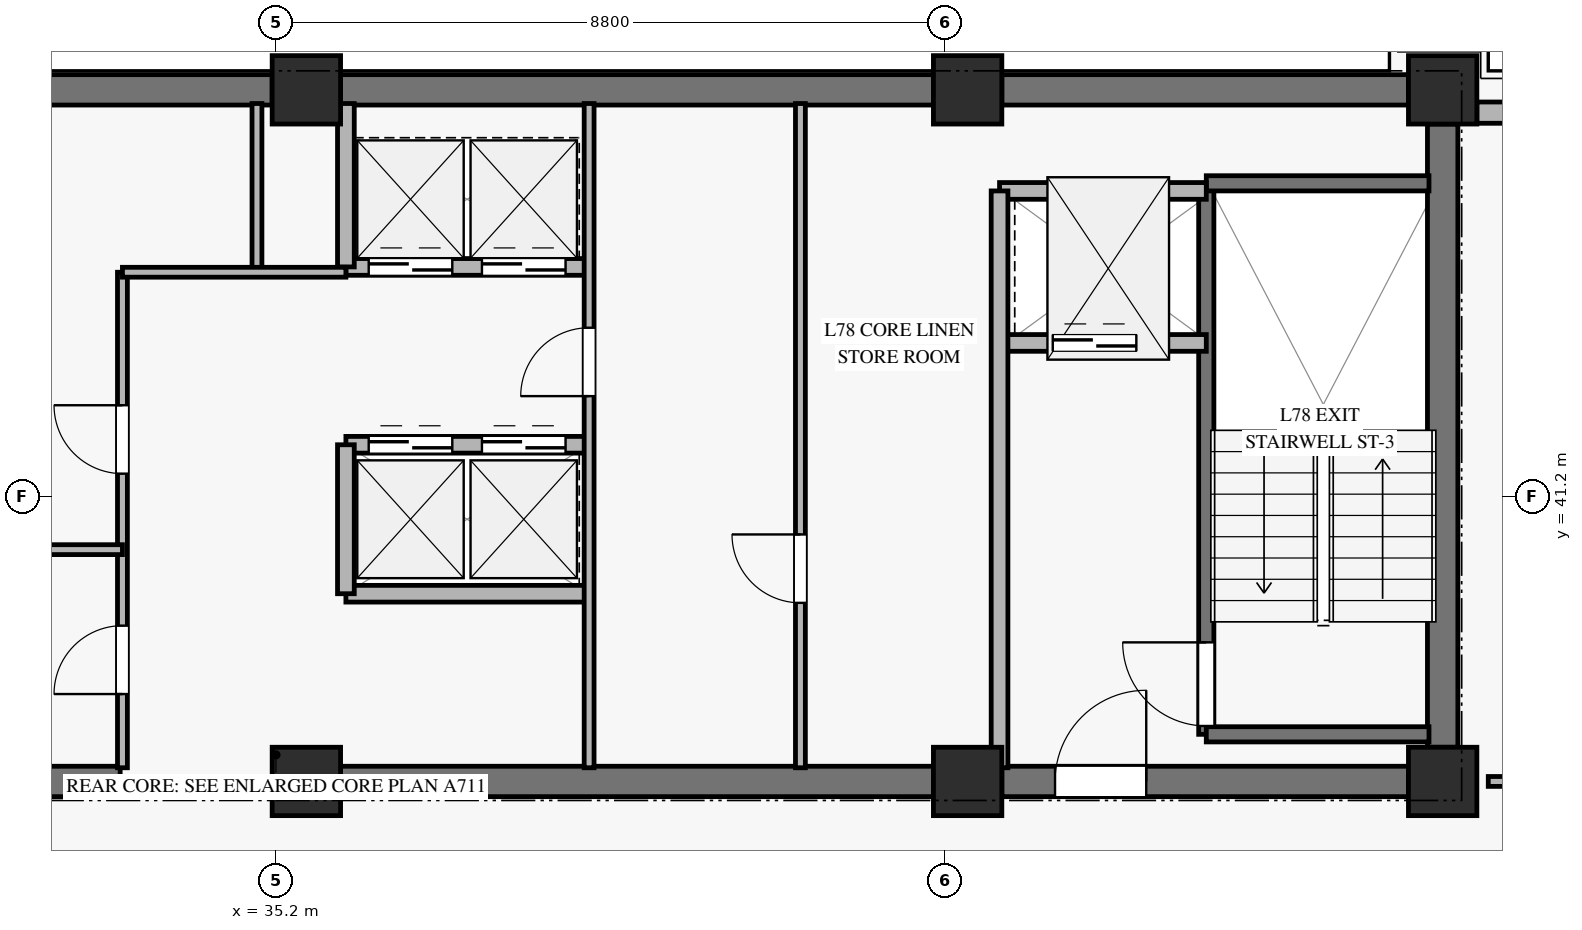
"""IFC4 building model, lengths in metres.
Left out: names, types, materials, properties, quantities, classifications, styles, units other than length and angle.
Written with IfcOpenShell. Run it as: python <this file> out.ifc"""

import sys

from ifc_helpers import new_model, si_unit, direction, frame, frame_2d, origin, origin_2d, place, context, subcontext, project, spatial, rectangle, extrude, source, transform, mapped, element, fill, save


model = new_model("IFC4")
c1 = context("Model", 3, precision=1e-05, world=origin(), true_north=direction((0.0, 1.0)))
c2 = subcontext(c1, "Body", "Model", "MODEL_VIEW")
j1 = project(units=[si_unit("LENGTHUNIT", "METRE"), si_unit("PLANEANGLEUNIT", "RADIAN")], contexts=[c1])
p1 = place(None, origin())
s1 = spatial("IfcSite", under=j1, at=p1, CompositionType="ELEMENT")
p2 = place(p1, origin())
s2 = spatial("IfcBuilding", under=s1, at=p2, CompositionType="ELEMENT")
p3 = place(p2, frame((0.0, 0.0, 304.0)))
s3 = spatial("IfcBuildingStorey", under=s2, at=p3, CompositionType="ELEMENT", Elevation=304.0)
m1 = source(origin(), c2, "Body", "SweptSolid", [
    extrude(rectangle(XDim=0.9, YDim=0.9, at=origin_2d()), origin(), (0.0, 0.0, 1.0), 3.185),
])
for number, where, z_axis, x_axis in (
    (1, (35.6, 37.45, 0.0), (0.0, 0.0, 1.0), (1.0, 0.0, 0.0)),
    (2, (35.6, 46.55, 0.0), (0.0, 0.0, 1.0), (1.0, 0.0, 0.0)),
    (3, (44.3, 37.45, 0.0), (0.0, 0.0, 1.0), (1.0, 0.0, 0.0)),
    (4, (44.3, 46.55, 0.0), (0.0, 0.0, 1.0), (1.0, 0.0, 0.0)),
    (5, (50.55, 37.45, 0.0), (0.0, 0.0, 1.0), (1.0, 0.0, 0.0)),
    (6, (50.55, 46.55, 0.0), (0.0, 0.0, 1.0), (1.0, 0.0, 0.0)),
):
    element("IfcColumn", number, at=place(p3, frame(where, z_axis=z_axis, x_axis=x_axis)), inside=s3, PredefinedType="PILASTER", context=c2, shape_type="MappedRepresentation", body=[
        mapped(m1, transform((0.0, 0.0, 0.0), x_axis=(1.0, 0.0, 0.0), y_axis=(0.0, 1.0, 0.0), z_axis=(0.0, 0.0, 1.0), scale=1.0)),
    ])
p4 = place(p3, frame((31.25, 46.55, 0.0), z_axis=(0.0, 0.0, 1.0), x_axis=(1.0, 0.0, 0.0)))
e7 = element("IfcWall", 7, at=p4, inside=s3, PredefinedType="SHEAR", context=c2, shape_type="SweptSolid", body=[
    extrude(rectangle(XDim=3.9, YDim=0.4, at=frame_2d((1.95, 0.0))), origin(), (0.0, 0.0, 1.0), 3.185),
])
p5 = place(p3, frame((36.05, 46.55, 0.0), z_axis=(0.0, 0.0, 1.0), x_axis=(1.0, 0.0, 0.0)))
e8 = element("IfcWall", 8, at=p5, inside=s3, PredefinedType="SHEAR", context=c2, shape_type="SweptSolid", body=[
    extrude(rectangle(XDim=7.8, YDim=0.4, at=frame_2d((3.9, 0.0))), origin(), (0.0, 0.0, 1.0), 3.185),
])
p6 = place(p3, frame((44.75, 46.55, 0.0), z_axis=(0.0, 0.0, 1.0), x_axis=(1.0, 0.0, 0.0)))
e9 = element("IfcWall", 9, at=p6, inside=s3, PredefinedType="SHEAR", context=c2, shape_type="SweptSolid", body=[
    extrude(rectangle(XDim=5.35, YDim=0.4, at=frame_2d((2.675, 0.0))), origin(), (0.0, 0.0, 1.0), 3.185),
])
p7 = place(p3, frame((31.25, 37.45, 0.0), z_axis=(0.0, 0.0, 1.0), x_axis=(1.0, 0.0, 0.0)))
e10 = element("IfcWall", 10, at=p7, inside=s3, PredefinedType="SHEAR", context=c2, shape_type="SweptSolid", body=[
    extrude(rectangle(XDim=1.9, YDim=0.4, at=frame_2d((0.95, 0.0))), origin(), (0.0, 0.0, 1.0), 3.185),
])
p8 = place(p3, frame((36.05, 37.45, 0.0), z_axis=(0.0, 0.0, 1.0), x_axis=(1.0, 0.0, 0.0)))
e11 = element("IfcWall", 11, at=p8, inside=s3, PredefinedType="SHEAR", context=c2, shape_type="SweptSolid", body=[
    extrude(rectangle(XDim=7.8, YDim=0.4, at=frame_2d((3.9, 0.0))), origin(), (0.0, 0.0, 1.0), 3.185),
])
p9 = place(p3, frame((44.75, 37.45, 0.0), z_axis=(0.0, 0.0, 1.0), x_axis=(1.0, 0.0, 0.0)))
e12 = element("IfcWall", 12, at=p9, inside=s3, PredefinedType="SHEAR", context=c2, shape_type="SweptSolid", body=[
    extrude(rectangle(XDim=5.35, YDim=0.4, at=frame_2d((2.675, 0.0))), origin(), (0.0, 0.0, 1.0), 3.185),
])
p10 = place(p9, frame((0.7, 0.0, 0.0)))
e13 = element("IfcOpeningElement", 13, at=p10, cuts=e12, PredefinedType="OPENING", context=c2, shape_type="SweptSolid", body=[
    extrude(rectangle(XDim=1.2, YDim=2.15, at=frame_2d((0.6, 1.075))), frame((0.0, 0.21, 0.0), z_axis=(0.0, -1.0, 0.0), x_axis=(1.0, 0.0, 0.0)), (0.0, 0.0, 1.0), 0.42),
])
p11 = place(p3, frame((50.55, 37.9, 0.0), z_axis=(0.0, 0.0, 1.0), x_axis=(0.0, 1.0, 0.0)))
e14 = element("IfcWall", 14, at=p11, inside=s3, PredefinedType="SHEAR", context=c2, shape_type="SweptSolid", body=[
    extrude(rectangle(XDim=8.2, YDim=0.4, at=frame_2d((4.1, 0.0))), origin(), (0.0, 0.0, 1.0), 3.185),
])
p12 = place(p3, frame((51.0, 46.25, 0.0), z_axis=(0.0, 0.0, 1.0), x_axis=(1.0, 0.0, 0.0)))
e15 = element("IfcWall", 15, at=p12, inside=s3, PredefinedType="SOLIDWALL", context=c2, shape_type="SweptSolid", body=[
    extrude(rectangle(XDim=6.375, YDim=0.28, at=frame_2d((3.188, 0.0))), origin(), (0.0, 0.0, 1.0), 2.815),
])
p13 = place(p12, frame((2.388, 0.0, 0.45)))
e16 = element("IfcOpeningElement", 16, at=p13, cuts=e15, PredefinedType="OPENING", context=c2, shape_type="SweptSolid", body=[
    extrude(rectangle(XDim=1.6, YDim=2.0, at=frame_2d((0.8, 1.0))), frame((0.0, 0.15, 0.0), z_axis=(0.0, -1.0, 0.0), x_axis=(1.0, 0.0, 0.0)), (0.0, 0.0, 1.0), 0.3),
])
p14 = place(p3, frame((47.44, 38.07, 0.0), z_axis=(0.0, 0.0, 1.0), x_axis=(0.0, 1.0, 0.0)))
e17 = element("IfcWall", 17, at=p14, inside=s3, PredefinedType="SOLIDWALL", context=c2, shape_type="SweptSolid", body=[
    extrude(rectangle(XDim=7.25, YDim=0.2, at=frame_2d((3.625, 0.0))), origin(), (0.0, 0.0, 1.0), 3.4),
])
p15 = place(p14, frame((0.11, 0.0, 0.0)))
e18 = element("IfcOpeningElement", 18, at=p15, cuts=e17, PredefinedType="OPENING", context=c2, shape_type="SweptSolid", body=[
    extrude(rectangle(XDim=1.1, YDim=2.15, at=frame_2d((0.55, 1.075))), frame((0.0, 0.11, 0.0), z_axis=(0.0, -1.0, 0.0), x_axis=(1.0, 0.0, 0.0)), (0.0, 0.0, 1.0), 0.22),
])
for number, where, z_axis, x_axis in (
    (19, (47.44, 45.32, 0.0), (0.0, 0.0, 1.0), (1.0, 0.0, 0.0)),
    (20, (47.44, 38.07, 0.0), (0.0, 0.0, 1.0), (1.0, 0.0, 0.0)),
):
    element("IfcWall", number, at=place(p3, frame(where, z_axis=z_axis, x_axis=x_axis)), inside=s3, PredefinedType="SOLIDWALL", context=c2, shape_type="SweptSolid", body=[
        extrude(rectangle(XDim=2.93, YDim=0.2, at=frame_2d((1.465, 0.0))), origin(), (0.0, 0.0, 1.0), 3.4),
    ])
p16 = place(p3, frame((44.72, 43.22, 0.0), z_axis=(0.0, 0.0, 1.0), x_axis=(1.0, 0.0, 0.0)))
e21 = element("IfcWall", 21, at=p16, inside=s3, PredefinedType="SOLIDWALL", context=c2, shape_type="SweptSolid", body=[
    extrude(rectangle(XDim=2.72, YDim=0.22, at=frame_2d((1.36, 0.0))), origin(), (0.0, 0.0, 1.0), 3.185),
])
p17 = place(p16, frame((0.7, 0.0, 0.0)))
e22 = element("IfcOpeningElement", 22, at=p17, cuts=e21, PredefinedType="OPENING", context=c2, shape_type="SweptSolid", body=[
    extrude(rectangle(XDim=1.1, YDim=2.2, at=frame_2d((0.55, 1.1))), frame((0.0, 0.12, 0.0), z_axis=(0.0, -1.0, 0.0), x_axis=(1.0, 0.0, 0.0)), (0.0, 0.0, 1.0), 0.24),
])
p18 = place(p3, frame((44.72, 45.22, 0.0), z_axis=(0.0, 0.0, 1.0), x_axis=(1.0, 0.0, 0.0)))
e23 = element("IfcWall", 23, at=p18, inside=s3, PredefinedType="SOLIDWALL", context=c2, shape_type="SweptSolid", body=[
    extrude(rectangle(XDim=2.72, YDim=0.22, at=frame_2d((1.36, 0.0))), origin(), (0.0, 0.0, 1.0), 3.185),
])
p19 = place(p3, frame((44.72, 37.63, 0.0), z_axis=(0.0, 0.0, 1.0), x_axis=(0.0, 1.0, 0.0)))
e24 = element("IfcWall", 24, at=p19, inside=s3, PredefinedType="SOLIDWALL", context=c2, shape_type="SweptSolid", body=[
    extrude(rectangle(XDim=7.59, YDim=0.22, at=frame_2d((3.795, 0.0))), origin(), (0.0, 0.0, 1.0), 3.185),
])
p20 = place(p3, frame((36.12, 44.22, 0.0), z_axis=(0.0, 0.0, 1.0), x_axis=(1.0, 0.0, 0.0)))
e25 = element("IfcWall", 25, at=p20, inside=s3, PredefinedType="SOLIDWALL", context=c2, shape_type="SweptSolid", body=[
    extrude(rectangle(XDim=3.2, YDim=0.22, at=frame_2d((1.6, 0.0))), origin(), (0.0, 0.0, 1.0), 3.185),
])
p21 = place(p20, frame((0.3, 0.0, 0.0)))
e26 = element("IfcOpeningElement", 26, at=p21, cuts=e25, PredefinedType="OPENING", context=c2, shape_type="SweptSolid", body=[
    extrude(rectangle(XDim=1.1, YDim=2.2, at=frame_2d((0.55, 1.1))), frame((0.0, 0.12, 0.0), z_axis=(0.0, -1.0, 0.0), x_axis=(1.0, 0.0, 0.0)), (0.0, 0.0, 1.0), 0.24),
])
p22 = place(p20, frame((1.79, 0.0, 0.0)))
e27 = element("IfcOpeningElement", 27, at=p22, cuts=e25, PredefinedType="OPENING", context=c2, shape_type="SweptSolid", body=[
    extrude(rectangle(XDim=1.1, YDim=2.2, at=frame_2d((0.55, 1.1))), frame((0.0, 0.12, 0.0), z_axis=(0.0, -1.0, 0.0), x_axis=(1.0, 0.0, 0.0)), (0.0, 0.0, 1.0), 0.24),
])
p23 = place(p3, frame((36.12, 41.88, 0.0), z_axis=(0.0, 0.0, 1.0), x_axis=(1.0, 0.0, 0.0)))
e28 = element("IfcWall", 28, at=p23, inside=s3, PredefinedType="SOLIDWALL", context=c2, shape_type="SweptSolid", body=[
    extrude(rectangle(XDim=3.2, YDim=0.22, at=frame_2d((1.6, 0.0))), origin(), (0.0, 0.0, 1.0), 3.185),
])
p24 = place(p23, frame((0.3, 0.0, 0.0)))
e29 = element("IfcOpeningElement", 29, at=p24, cuts=e28, PredefinedType="OPENING", context=c2, shape_type="SweptSolid", body=[
    extrude(rectangle(XDim=1.1, YDim=2.2, at=frame_2d((0.55, 1.1))), frame((0.0, 0.12, 0.0), z_axis=(0.0, -1.0, 0.0), x_axis=(1.0, 0.0, 0.0)), (0.0, 0.0, 1.0), 0.24),
])
p25 = place(p23, frame((1.79, 0.0, 0.0)))
e30 = element("IfcOpeningElement", 30, at=p25, cuts=e28, PredefinedType="OPENING", context=c2, shape_type="SweptSolid", body=[
    extrude(rectangle(XDim=1.1, YDim=2.2, at=frame_2d((0.55, 1.1))), frame((0.0, 0.12, 0.0), z_axis=(0.0, -1.0, 0.0), x_axis=(1.0, 0.0, 0.0)), (0.0, 0.0, 1.0), 0.24),
])
p26 = place(p3, frame((36.12, 39.92, 0.0), z_axis=(0.0, 0.0, 1.0), x_axis=(1.0, 0.0, 0.0)))
e31 = element("IfcWall", 31, at=p26, inside=s3, PredefinedType="SOLIDWALL", context=c2, shape_type="SweptSolid", body=[
    extrude(rectangle(XDim=3.2, YDim=0.22, at=frame_2d((1.6, 0.0))), origin(), (0.0, 0.0, 1.0), 3.185),
])
p27 = place(p3, frame((36.12, 39.92, 0.0), z_axis=(0.0, 0.0, 1.0), x_axis=(0.0, 1.0, 0.0)))
e32 = element("IfcWall", 32, at=p27, inside=s3, PredefinedType="SOLIDWALL", context=c2, shape_type="SweptSolid", body=[
    extrude(rectangle(XDim=1.96, YDim=0.22, at=frame_2d((0.98, 0.0))), origin(), (0.0, 0.0, 1.0), 3.185),
])
p28 = place(p3, frame((36.12, 44.22, 0.0), z_axis=(0.0, 0.0, 1.0), x_axis=(0.0, 1.0, 0.0)))
e33 = element("IfcWall", 33, at=p28, inside=s3, PredefinedType="SOLIDWALL", context=c2, shape_type="SweptSolid", body=[
    extrude(rectangle(XDim=2.15, YDim=0.22, at=frame_2d((1.075, 0.0))), origin(), (0.0, 0.0, 1.0), 3.185),
])
p29 = place(p3, frame((33.18, 37.63, 0.0), z_axis=(0.0, 0.0, 1.0), x_axis=(0.0, 1.0, 0.0)))
e34 = element("IfcWall", 34, at=p29, inside=s3, PredefinedType="PARTITIONING", context=c2, shape_type="SweptSolid", body=[
    extrude(rectangle(XDim=6.52, YDim=0.13, at=frame_2d((3.26, 0.0))), origin(), (0.0, 0.0, 1.0), 2.27),
])
p30 = place(p29, frame((0.97, 0.0, 0.0)))
e35 = element("IfcOpeningElement", 35, at=p30, cuts=e34, PredefinedType="OPENING", context=c2, shape_type="SweptSolid", body=[
    extrude(rectangle(XDim=0.9, YDim=2.1, at=frame_2d((0.45, 1.05))), frame((0.0, 0.075, 0.0), z_axis=(0.0, -1.0, 0.0), x_axis=(1.0, 0.0, 0.0)), (0.0, 0.0, 1.0), 0.15),
])
p31 = place(p29, frame((3.87, 0.0, 0.0)))
e36 = element("IfcOpeningElement", 36, at=p31, cuts=e34, PredefinedType="OPENING", context=c2, shape_type="SweptSolid", body=[
    extrude(rectangle(XDim=0.9, YDim=2.1, at=frame_2d((0.45, 1.05))), frame((0.0, 0.075, 0.0), z_axis=(0.0, -1.0, 0.0), x_axis=(1.0, 0.0, 0.0)), (0.0, 0.0, 1.0), 0.15),
])
p32 = place(p3, frame((34.95, 44.15, 0.0), z_axis=(0.0, 0.0, 1.0), x_axis=(0.0, 1.0, 0.0)))
e37 = element("IfcWall", 37, at=p32, inside=s3, PredefinedType="PARTITIONING", context=c2, shape_type="SweptSolid", body=[
    extrude(rectangle(XDim=2.22, YDim=0.13, at=frame_2d((1.11, 0.0))), origin(), (0.0, 0.0, 1.0), 3.185),
])
p33 = place(p3, frame((33.18, 44.15, 0.0), z_axis=(0.0, 0.0, 1.0), x_axis=(1.0, 0.0, 0.0)))
e38 = element("IfcWall", 38, at=p33, inside=s3, PredefinedType="PARTITIONING", context=c2, shape_type="SweptSolid", body=[
    extrude(rectangle(XDim=2.94, YDim=0.13, at=frame_2d((1.47, 0.0))), origin(), (0.0, 0.0, 1.0), 2.47),
])
p34 = place(p3, frame((39.32, 37.63, 0.0), z_axis=(0.0, 0.0, 1.0), x_axis=(0.0, 1.0, 0.0)))
e39 = element("IfcWall", 39, at=p34, inside=s3, PredefinedType="PARTITIONING", context=c2, shape_type="SweptSolid", body=[
    extrude(rectangle(XDim=8.74, YDim=0.13, at=frame_2d((4.37, 0.0))), origin(), (0.0, 0.0, 1.0), 3.185),
])
p35 = place(p34, frame((4.89, 0.0, 0.0)))
e40 = element("IfcOpeningElement", 40, at=p35, cuts=e39, PredefinedType="OPENING", context=c2, shape_type="SweptSolid", body=[
    extrude(rectangle(XDim=0.9, YDim=2.1, at=frame_2d((0.45, 1.05))), frame((0.0, 0.075, 0.0), z_axis=(0.0, -1.0, 0.0), x_axis=(1.0, 0.0, 0.0)), (0.0, 0.0, 1.0), 0.15),
])
p36 = place(p3, frame((30.22, 40.5, 0.0), z_axis=(0.0, 0.0, 1.0), x_axis=(1.0, 0.0, 0.0)))
e41 = element("IfcWall", 41, at=p36, inside=s3, PredefinedType="PARTITIONING", context=c2, shape_type="SweptSolid", body=[
    extrude(rectangle(XDim=2.96, YDim=0.13, at=frame_2d((1.48, 0.0))), origin(), (0.0, 0.0, 1.0), 2.47),
])
p37 = place(p3, frame((42.1, 37.63, 0.0), z_axis=(0.0, 0.0, 1.0), x_axis=(0.0, 1.0, 0.0)))
e42 = element("IfcWall", 42, at=p37, inside=s3, PredefinedType="PARTITIONING", context=c2, shape_type="SweptSolid", body=[
    extrude(rectangle(XDim=8.74, YDim=0.13, at=frame_2d((4.37, 0.0))), origin(), (0.0, 0.0, 1.0), 3.185),
])
p38 = place(p37, frame((2.17, 0.0, 0.0)))
e43 = element("IfcOpeningElement", 43, at=p38, cuts=e42, PredefinedType="OPENING", context=c2, shape_type="SweptSolid", body=[
    extrude(rectangle(XDim=0.9, YDim=2.1, at=frame_2d((0.45, 1.05))), frame((0.0, 0.075, 0.0), z_axis=(0.0, -1.0, 0.0), x_axis=(1.0, 0.0, 0.0)), (0.0, 0.0, 1.0), 0.15),
])
p39 = place(p3, frame((51.15, 37.45, 0.0), z_axis=(0.0, 0.0, 1.0), x_axis=(1.0, 0.0, 0.0)))
e44 = element("IfcWall", 44, at=p39, inside=s3, PredefinedType="PARTITIONING", context=c2, shape_type="SweptSolid", body=[
    extrude(rectangle(XDim=8.81, YDim=0.13, at=frame_2d((4.405, 0.0))), origin(), (0.0, 0.0, 1.0), 2.82),
])
p40 = place(p39, frame((0.5, 0.0, 0.0)))
e45 = element("IfcOpeningElement", 45, at=p40, cuts=e44, PredefinedType="OPENING", context=c2, shape_type="SweptSolid", body=[
    extrude(rectangle(XDim=0.9, YDim=2.1, at=frame_2d((0.45, 1.05))), frame((0.0, 0.075, 0.0), z_axis=(0.0, -1.0, 0.0), x_axis=(1.0, 0.0, 0.0)), (0.0, 0.0, 1.0), 0.15),
])
p41 = place(p39, frame((6.607, 0.0, 0.0)))
e46 = element("IfcOpeningElement", 46, at=p41, cuts=e44, PredefinedType="OPENING", context=c2, shape_type="SweptSolid", body=[
    extrude(rectangle(XDim=0.95, YDim=2.1, at=frame_2d((0.475, 1.05))), frame((0.0, 0.075, 0.0), z_axis=(0.0, -1.0, 0.0), x_axis=(1.0, 0.0, 0.0)), (0.0, 0.0, 1.0), 0.15),
])
m2 = source(origin(), c2, "Body", "SweptSolid", [
    extrude(rectangle(XDim=1.1, YDim=2.15, at=frame_2d((0.55, 1.075))), frame((0.0, 0.025, 0.0), z_axis=(0.0, -1.0, 0.0), x_axis=(1.0, 0.0, 0.0)), (0.0, 0.0, 1.0), 0.05),
])
p42 = place(p15, origin())
e47 = element("IfcDoor", 47, at=p42, inside=s3, OperationType="SINGLE_SWING_RIGHT", PredefinedType="DOOR", context=c2, shape_type="MappedRepresentation", body=[
    mapped(m2, transform((0.0, 0.0, 0.0), x_axis=(1.0, 0.0, 0.0), y_axis=(0.0, 1.0, 0.0), z_axis=(0.0, 0.0, 1.0), scale=1.0)),
])
fill(e18, e47)
m3 = source(origin(), c2, "Body", "SweptSolid", [
    extrude(rectangle(XDim=1.1, YDim=2.2, at=frame_2d((0.55, 1.1))), frame((0.0, 0.025, 0.0), z_axis=(0.0, -1.0, 0.0), x_axis=(1.0, 0.0, 0.0)), (0.0, 0.0, 1.0), 0.05),
])
p43 = place(p17, origin())
e48 = element("IfcDoor", 48, at=p43, inside=s3, OperationType="SLIDING_TO_LEFT", PredefinedType="DOOR", context=c2, shape_type="MappedRepresentation", body=[
    mapped(m3, transform((0.0, 0.0, 0.0), x_axis=(1.0, 0.0, 0.0), y_axis=(0.0, 1.0, 0.0), z_axis=(0.0, 0.0, 1.0), scale=1.0)),
])
fill(e22, e48)
m4 = source(origin(), c2, "Body", "SweptSolid", [
    extrude(rectangle(XDim=1.2, YDim=2.15, at=frame_2d((0.6, 1.075))), frame((0.0, 0.025, 0.0), z_axis=(0.0, -1.0, 0.0), x_axis=(1.0, 0.0, 0.0)), (0.0, 0.0, 1.0), 0.05),
])
p44 = place(p10, origin())
e49 = element("IfcDoor", 49, at=p44, inside=s3, OperationType="SINGLE_SWING_RIGHT", PredefinedType="DOOR", context=c2, shape_type="MappedRepresentation", body=[
    mapped(m4, transform((0.0, 0.0, 0.0), x_axis=(1.0, 0.0, 0.0), y_axis=(0.0, 1.0, 0.0), z_axis=(0.0, 0.0, 1.0), scale=1.0)),
])
fill(e13, e49)
p45 = place(p21, origin())
e50 = element("IfcDoor", 50, at=p45, inside=s3, OperationType="SLIDING_TO_LEFT", PredefinedType="DOOR", context=c2, shape_type="MappedRepresentation", body=[
    mapped(m3, transform((0.0, 0.0, 0.0), x_axis=(1.0, 0.0, 0.0), y_axis=(0.0, 1.0, 0.0), z_axis=(0.0, 0.0, 1.0), scale=1.0)),
])
fill(e26, e50)
p46 = place(p22, origin())
e51 = element("IfcDoor", 51, at=p46, inside=s3, OperationType="SLIDING_TO_LEFT", PredefinedType="DOOR", context=c2, shape_type="MappedRepresentation", body=[
    mapped(m3, transform((0.0, 0.0, 0.0), x_axis=(1.0, 0.0, 0.0), y_axis=(0.0, 1.0, 0.0), z_axis=(0.0, 0.0, 1.0), scale=1.0)),
])
fill(e27, e51)
p47 = place(p24, origin())
e52 = element("IfcDoor", 52, at=p47, inside=s3, OperationType="SLIDING_TO_LEFT", PredefinedType="DOOR", context=c2, shape_type="MappedRepresentation", body=[
    mapped(m3, transform((0.0, 0.0, 0.0), x_axis=(1.0, 0.0, 0.0), y_axis=(0.0, 1.0, 0.0), z_axis=(0.0, 0.0, 1.0), scale=1.0)),
])
fill(e29, e52)
p48 = place(p25, origin())
e53 = element("IfcDoor", 53, at=p48, inside=s3, OperationType="SLIDING_TO_LEFT", PredefinedType="DOOR", context=c2, shape_type="MappedRepresentation", body=[
    mapped(m3, transform((0.0, 0.0, 0.0), x_axis=(1.0, 0.0, 0.0), y_axis=(0.0, 1.0, 0.0), z_axis=(0.0, 0.0, 1.0), scale=1.0)),
])
fill(e30, e53)
m5 = source(origin(), c2, "Body", "SweptSolid", [
    extrude(rectangle(XDim=0.9, YDim=2.1, at=frame_2d((0.45, 1.05))), frame((0.0, 0.025, 0.0), z_axis=(0.0, -1.0, 0.0), x_axis=(1.0, 0.0, 0.0)), (0.0, 0.0, 1.0), 0.05),
])
p49 = place(p30, origin())
e54 = element("IfcDoor", 54, at=p49, inside=s3, OperationType="SINGLE_SWING_LEFT", PredefinedType="DOOR", context=c2, shape_type="MappedRepresentation", body=[
    mapped(m5, transform((0.0, 0.0, 0.0), x_axis=(1.0, 0.0, 0.0), y_axis=(0.0, 1.0, 0.0), z_axis=(0.0, 0.0, 1.0), scale=1.0)),
])
fill(e35, e54)
p50 = place(p31, origin())
e55 = element("IfcDoor", 55, at=p50, inside=s3, OperationType="SINGLE_SWING_RIGHT", PredefinedType="DOOR", context=c2, shape_type="MappedRepresentation", body=[
    mapped(m5, transform((0.0, 0.0, 0.0), x_axis=(1.0, 0.0, 0.0), y_axis=(0.0, 1.0, 0.0), z_axis=(0.0, 0.0, 1.0), scale=1.0)),
])
fill(e36, e55)
p51 = place(p35, origin())
e56 = element("IfcDoor", 56, at=p51, inside=s3, OperationType="SINGLE_SWING_LEFT", PredefinedType="DOOR", context=c2, shape_type="MappedRepresentation", body=[
    mapped(m5, transform((0.0, 0.0, 0.0), x_axis=(1.0, 0.0, 0.0), y_axis=(0.0, 1.0, 0.0), z_axis=(0.0, 0.0, 1.0), scale=1.0)),
])
fill(e40, e56)
p52 = place(p38, origin())
e57 = element("IfcDoor", 57, at=p52, inside=s3, OperationType="SINGLE_SWING_RIGHT", PredefinedType="DOOR", context=c2, shape_type="MappedRepresentation", body=[
    mapped(m5, transform((0.0, 0.0, 0.0), x_axis=(1.0, 0.0, 0.0), y_axis=(0.0, 1.0, 0.0), z_axis=(0.0, 0.0, 1.0), scale=1.0)),
])
fill(e43, e57)
save(model, sys.argv[1])
